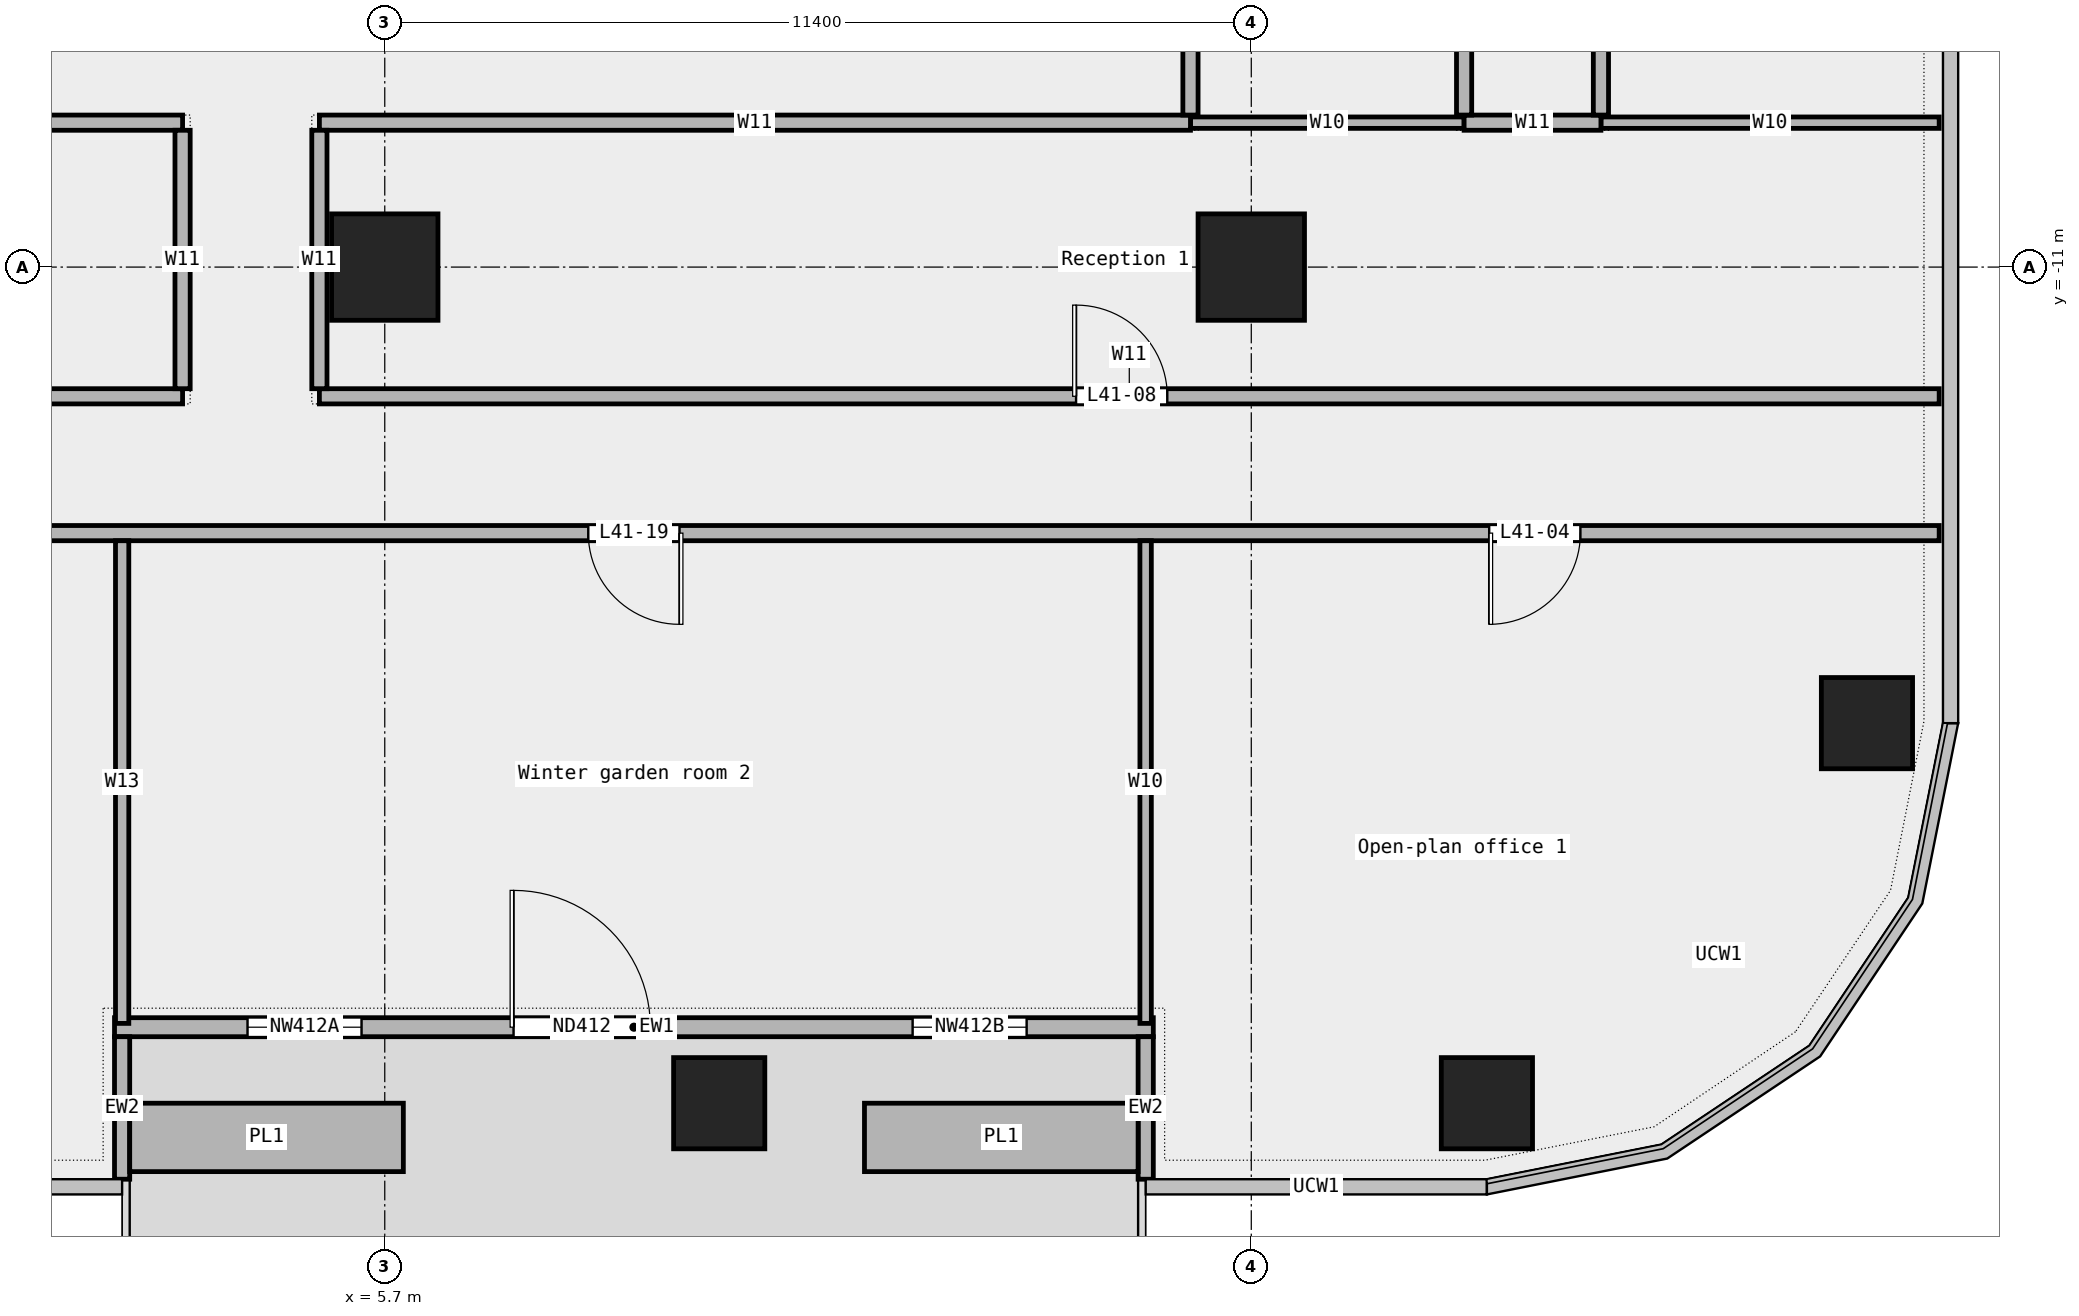
"""IFC4 building model, lengths in metres.
Left out: names, types, materials, properties, quantities, classifications, styles, units other than length and angle.
Written with IfcOpenShell. Run it as: python <this file> out.ifc"""

import sys

from ifc_helpers import new_model, si_unit, direction, frame, frame_2d, origin, origin_2d, place, context, subcontext, project, spatial, rectangle, extrude, element, fill, save


model = new_model("IFC4")
c1 = context("Model", 3, precision=1e-05, world=origin(), true_north=direction((0.0, 1.0)))
c2 = subcontext(c1, "Body", "Model", "MODEL_VIEW")
j1 = project(units=[si_unit("LENGTHUNIT", "METRE"), si_unit("PLANEANGLEUNIT", "RADIAN")], contexts=[c1])
p1 = place(None, origin())
s1 = spatial("IfcSite", under=j1, at=p1, CompositionType="ELEMENT")
p2 = place(p1, origin())
s2 = spatial("IfcBuilding", under=s1, at=p2, CompositionType="ELEMENT")
p3 = place(p2, frame((0.0, 0.0, 197.0)))
s3 = spatial("IfcBuildingStorey", under=s2, at=p3, CompositionType="ELEMENT", Elevation=197.0)
for number, where, z_axis, x_axis in (
    (1, (10.1, -22.0, 0.0), (0.0, 0.0, 1.0), (1.0, 0.0, 0.0)),
    (2, (20.2, -22.0, 0.0), (0.0, 0.0, 1.0), (1.0, 0.0, 0.0)),
    (3, (25.2, -17.0, 0.0), (0.0, 0.0, 1.0), (1.0, 0.0, 0.0)),
):
    element("IfcColumn", number, at=place(p3, frame(where, z_axis=z_axis, x_axis=x_axis)), inside=s3, PredefinedType="COLUMN", context=c2, shape_type="SweptSolid", body=[
        extrude(rectangle(XDim=1.2, YDim=1.2, at=origin_2d()), origin(), (0.0, 0.0, 1.0), 3.6),
    ])
for number, where, z_axis, x_axis in (
    (4, (5.7, -11.0, 0.0), (0.0, 0.0, 1.0), (1.0, 0.0, 0.0)),
    (5, (17.1, -11.0, 0.0), (0.0, 0.0, 1.0), (1.0, 0.0, 0.0)),
):
    element("IfcColumn", number, at=place(p3, frame(where, z_axis=z_axis, x_axis=x_axis)), inside=s3, PredefinedType="COLUMN", context=c2, shape_type="SweptSolid", body=[
        extrude(rectangle(XDim=1.4, YDim=1.4, at=origin_2d()), origin(), (0.0, 0.0, 1.0), 3.6),
    ])
p4 = place(p3, frame((2.145, -21.0, 0.0), z_axis=(0.0, 0.0, 1.0), x_axis=(1.0, 0.0, 0.0)))
e6 = element("IfcWall", 6, at=p4, inside=s3, PredefinedType="STANDARD", context=c2, shape_type="SweptSolid", body=[
    extrude(rectangle(XDim=13.667, YDim=0.25, at=frame_2d((6.833, 0.0))), origin(), (0.0, 0.0, 1.0), 3.6),
])
p5 = place(p4, frame((1.75, 0.0, 0.45)))
e7 = element("IfcOpeningElement", 7, at=p5, cuts=e6, PredefinedType="OPENING", context=c2, shape_type="SweptSolid", body=[
    extrude(rectangle(XDim=1.5, YDim=2.4, at=frame_2d((0.75, 1.2))), frame((0.0, 0.137, 0.0), z_axis=(0.0, -1.0, 0.0), x_axis=(1.0, 0.0, 0.0)), (0.0, 0.0, 1.0), 0.274),
])
p6 = place(p4, frame((5.25, 0.0, 0.0)))
e8 = element("IfcOpeningElement", 8, at=p6, cuts=e6, PredefinedType="OPENING", context=c2, shape_type="SweptSolid", body=[
    extrude(rectangle(XDim=1.8, YDim=2.4, at=frame_2d((0.9, 1.2))), frame((0.0, 0.137, 0.0), z_axis=(0.0, -1.0, 0.0), x_axis=(1.0, 0.0, 0.0)), (0.0, 0.0, 1.0), 0.274),
])
p7 = place(p4, frame((10.5, 0.0, 0.45)))
e9 = element("IfcOpeningElement", 9, at=p7, cuts=e6, PredefinedType="OPENING", context=c2, shape_type="SweptSolid", body=[
    extrude(rectangle(XDim=1.5, YDim=2.4, at=frame_2d((0.75, 1.2))), frame((0.0, 0.137, 0.0), z_axis=(0.0, -1.0, 0.0), x_axis=(1.0, 0.0, 0.0)), (0.0, 0.0, 1.0), 0.274),
])
for number, where, z_axis, x_axis in (
    (10, (2.244, -23.0, 0.0), (0.0, 0.0, 1.0), (0.0, 1.0, 0.0)),
    (11, (15.711, -23.0, 0.0), (0.0, 0.0, 1.0), (0.0, 1.0, 0.0)),
):
    element("IfcWall", number, at=place(p3, frame(where, z_axis=z_axis, x_axis=x_axis)), inside=s3, PredefinedType="STANDARD", context=c2, shape_type="SweptSolid", body=[
        extrude(rectangle(XDim=1.875, YDim=0.2, at=frame_2d((0.938, 0.0))), origin(), (0.0, 0.0, 1.0), 3.6),
    ])
for number, where, z_axis, x_axis in (
    (12, (2.344, -22.45, 0.0), (0.0, 0.0, 1.0), (1.0, 0.0, 0.0)),
    (13, (12.011, -22.45, 0.0), (0.0, 0.0, 1.0), (1.0, 0.0, 0.0)),
):
    element("IfcWall", number, at=place(p3, frame(where, z_axis=z_axis, x_axis=x_axis)), inside=s3, PredefinedType="STANDARD", context=c2, shape_type="SweptSolid", body=[
        extrude(rectangle(XDim=3.6, YDim=0.9, at=frame_2d((1.8, 0.0))), origin(), (0.0, 0.0, 1.0), 0.7),
    ])
p8 = place(p3, frame((-26.15, -14.5, 0.0), z_axis=(0.0, 0.0, 1.0), x_axis=(1.0, 0.0, 0.0)))
e14 = element("IfcWall", 14, at=p8, inside=s3, PredefinedType="PARTITIONING", context=c2, shape_type="SweptSolid", body=[
    extrude(rectangle(XDim=52.3, YDim=0.2, at=frame_2d((26.15, 0.0))), origin(), (0.0, 0.0, 1.0), 3.6),
])
p9 = place(p8, frame((46.38, 0.0, 0.0)))
e15 = element("IfcOpeningElement", 15, at=p9, cuts=e14, PredefinedType="OPENING", context=c2, shape_type="SweptSolid", body=[
    extrude(rectangle(XDim=1.2, YDim=2.1, at=frame_2d((0.6, 1.05))), frame((0.0, 0.112, 0.0), z_axis=(0.0, -1.0, 0.0), x_axis=(1.0, 0.0, 0.0)), (0.0, 0.0, 1.0), 0.224),
])
p10 = place(p8, frame((5.938, 0.0, 0.0)))
e16 = element("IfcOpeningElement", 16, at=p10, cuts=e14, PredefinedType="OPENING", context=c2, shape_type="SweptSolid", body=[
    extrude(rectangle(XDim=1.5, YDim=2.1, at=frame_2d((0.75, 1.05))), frame((0.0, 0.112, 0.0), z_axis=(0.0, -1.0, 0.0), x_axis=(1.0, 0.0, 0.0)), (0.0, 0.0, 1.0), 0.224),
])
p11 = place(p8, frame((20.035, 0.0, 0.0)))
e17 = element("IfcOpeningElement", 17, at=p11, cuts=e14, PredefinedType="OPENING", context=c2, shape_type="SweptSolid", body=[
    extrude(rectangle(XDim=1.5, YDim=2.1, at=frame_2d((0.75, 1.05))), frame((0.0, 0.112, 0.0), z_axis=(0.0, -1.0, 0.0), x_axis=(1.0, 0.0, 0.0)), (0.0, 0.0, 1.0), 0.224),
])
p12 = place(p8, frame((34.528, 0.0, 0.0)))
e18 = element("IfcOpeningElement", 18, at=p12, cuts=e14, PredefinedType="OPENING", context=c2, shape_type="SweptSolid", body=[
    extrude(rectangle(XDim=1.2, YDim=2.1, at=frame_2d((0.6, 1.05))), frame((0.0, 0.112, 0.0), z_axis=(0.0, -1.0, 0.0), x_axis=(1.0, 0.0, 0.0)), (0.0, 0.0, 1.0), 0.224),
])
p13 = place(p3, frame((-9.385, -12.7, 0.0), z_axis=(0.0, 0.0, 1.0), x_axis=(1.0, 0.0, 0.0)))
e19 = element("IfcWall", 19, at=p13, inside=s3, PredefinedType="PARTITIONING", context=c2, shape_type="SweptSolid", body=[
    extrude(rectangle(XDim=12.425, YDim=0.2, at=frame_2d((6.212, 0.0))), origin(), (0.0, 0.0, 1.0), 3.6),
])
p14 = place(p3, frame((4.84, -12.7, 0.0), z_axis=(0.0, 0.0, 1.0), x_axis=(1.0, 0.0, 0.0)))
e20 = element("IfcWall", 20, at=p14, inside=s3, PredefinedType="PARTITIONING", context=c2, shape_type="SweptSolid", body=[
    extrude(rectangle(XDim=21.31, YDim=0.2, at=frame_2d((10.655, 0.0))), origin(), (0.0, 0.0, 1.0), 3.6),
])
p15 = place(p14, frame((9.955, 0.0, 0.0)))
e21 = element("IfcOpeningElement", 21, at=p15, cuts=e20, PredefinedType="OPENING", context=c2, shape_type="SweptSolid", body=[
    extrude(rectangle(XDim=1.2, YDim=2.1, at=frame_2d((0.6, 1.05))), frame((0.0, 0.112, 0.0), z_axis=(0.0, -1.0, 0.0), x_axis=(1.0, 0.0, 0.0)), (0.0, 0.0, 1.0), 0.224),
])
p16 = place(p3, frame((16.3, -9.1, 0.0), z_axis=(0.0, 0.0, 1.0), x_axis=(1.0, 0.0, 0.0)))
e22 = element("IfcWall", 22, at=p16, inside=s3, PredefinedType="PARTITIONING", context=c2, shape_type="SweptSolid", body=[
    extrude(rectangle(XDim=3.6, YDim=0.15, at=frame_2d((1.8, 0.0))), origin(), (0.0, 0.0, 1.0), 3.6),
])
p17 = place(p3, frame((21.7, -9.1, 0.0), z_axis=(0.0, 0.0, 1.0), x_axis=(1.0, 0.0, 0.0)))
e23 = element("IfcWall", 23, at=p17, inside=s3, PredefinedType="PARTITIONING", context=c2, shape_type="SweptSolid", body=[
    extrude(rectangle(XDim=4.45, YDim=0.15, at=frame_2d((2.225, 0.0))), origin(), (0.0, 0.0, 1.0), 3.6),
])
p18 = place(p3, frame((-9.385, -9.1, 0.0), z_axis=(0.0, 0.0, 1.0), x_axis=(1.0, 0.0, 0.0)))
e24 = element("IfcWall", 24, at=p18, inside=s3, PredefinedType="PARTITIONING", context=c2, shape_type="SweptSolid", body=[
    extrude(rectangle(XDim=12.425, YDim=0.2, at=frame_2d((6.212, 0.0))), origin(), (0.0, 0.0, 1.0), 3.6),
])
p19 = place(p18, frame((5.762, 0.0, 0.0)))
e25 = element("IfcOpeningElement", 25, at=p19, cuts=e24, PredefinedType="OPENING", context=c2, shape_type="SweptSolid", body=[
    extrude(rectangle(XDim=0.9, YDim=2.1, at=frame_2d((0.45, 1.05))), frame((0.0, 0.112, 0.0), z_axis=(0.0, -1.0, 0.0), x_axis=(1.0, 0.0, 0.0)), (0.0, 0.0, 1.0), 0.224),
])
p20 = place(p3, frame((4.84, -9.1, 0.0), z_axis=(0.0, 0.0, 1.0), x_axis=(1.0, 0.0, 0.0)))
e26 = element("IfcWall", 26, at=p20, inside=s3, PredefinedType="PARTITIONING", context=c2, shape_type="SweptSolid", body=[
    extrude(rectangle(XDim=11.46, YDim=0.2, at=frame_2d((5.73, 0.0))), origin(), (0.0, 0.0, 1.0), 3.6),
])
p21 = place(p3, frame((19.9, -9.1, 0.0), z_axis=(0.0, 0.0, 1.0), x_axis=(1.0, 0.0, 0.0)))
e27 = element("IfcWall", 27, at=p21, inside=s3, PredefinedType="PARTITIONING", context=c2, shape_type="SweptSolid", body=[
    extrude(rectangle(XDim=1.8, YDim=0.2, at=frame_2d((0.9, 0.0))), origin(), (0.0, 0.0, 1.0), 3.6),
])
p22 = place(p3, frame((2.245, -20.95, 0.0), z_axis=(0.0, 0.0, 1.0), x_axis=(0.0, 1.0, 0.0)))
e28 = element("IfcWall", 28, at=p22, inside=s3, PredefinedType="PARTITIONING", context=c2, shape_type="SweptSolid", body=[
    extrude(rectangle(XDim=6.35, YDim=0.175, at=frame_2d((3.175, 0.0))), origin(), (0.0, 0.0, 1.0), 3.6),
])
for number, where, z_axis, x_axis in (
    (29, (3.04, -12.6, 0.0), (0.0, 0.0, 1.0), (0.0, 1.0, 0.0)),
    (30, (4.84, -12.6, 0.0), (0.0, 0.0, 1.0), (0.0, 1.0, 0.0)),
):
    element("IfcWall", number, at=place(p3, frame(where, z_axis=z_axis, x_axis=x_axis)), inside=s3, PredefinedType="PARTITIONING", context=c2, shape_type="SweptSolid", body=[
        extrude(rectangle(XDim=3.4, YDim=0.2, at=frame_2d((1.7, 0.0))), origin(), (0.0, 0.0, 1.0), 3.6),
    ])
p23 = place(p3, frame((15.71, -20.95, 0.0), z_axis=(0.0, 0.0, 1.0), x_axis=(0.0, 1.0, 0.0)))
e31 = element("IfcWall", 31, at=p23, inside=s3, PredefinedType="PARTITIONING", context=c2, shape_type="SweptSolid", body=[
    extrude(rectangle(XDim=6.35, YDim=0.15, at=frame_2d((3.175, 0.0))), origin(), (0.0, 0.0, 1.0), 3.6),
])
p24 = place(p3, frame((16.3, -9.0, 0.0), z_axis=(0.0, 0.0, 1.0), x_axis=(0.0, 1.0, 0.0)))
e32 = element("IfcWall", 32, at=p24, inside=s3, PredefinedType="PARTITIONING", context=c2, shape_type="SweptSolid", body=[
    extrude(rectangle(XDim=8.3, YDim=0.2, at=frame_2d((4.15, 0.0))), origin(), (0.0, 0.0, 1.0), 3.6),
])
p25 = place(p3, frame((19.9, -9.0, 0.0), z_axis=(0.0, 0.0, 1.0), x_axis=(0.0, 1.0, 0.0)))
e33 = element("IfcWall", 33, at=p25, inside=s3, PredefinedType="PARTITIONING", context=c2, shape_type="SweptSolid", body=[
    extrude(rectangle(XDim=11.15, YDim=0.2, at=frame_2d((5.575, 0.0))), origin(), (0.0, 0.0, 1.0), 3.6),
])
p26 = place(p25, frame((5.125, 0.0, 0.0)))
e34 = element("IfcOpeningElement", 34, at=p26, cuts=e33, PredefinedType="OPENING", context=c2, shape_type="SweptSolid", body=[
    extrude(rectangle(XDim=0.9, YDim=2.1, at=frame_2d((0.45, 1.05))), frame((0.0, 0.112, 0.0), z_axis=(0.0, -1.0, 0.0), x_axis=(1.0, 0.0, 0.0)), (0.0, 0.0, 1.0), 0.224),
])
p27 = place(p3, frame((21.7, -9.0, 0.0), z_axis=(0.0, 0.0, 1.0), x_axis=(0.0, 1.0, 0.0)))
e35 = element("IfcWall", 35, at=p27, inside=s3, PredefinedType="PARTITIONING", context=c2, shape_type="SweptSolid", body=[
    extrude(rectangle(XDim=24.3, YDim=0.2, at=frame_2d((12.15, 0.0))), origin(), (0.0, 0.0, 1.0), 3.6),
])
p28 = place(p27, frame((4.795, 0.0, 0.0)))
e36 = element("IfcOpeningElement", 36, at=p28, cuts=e35, PredefinedType="OPENING", context=c2, shape_type="SweptSolid", body=[
    extrude(rectangle(XDim=1.2, YDim=2.1, at=frame_2d((0.6, 1.05))), frame((0.0, 0.112, 0.0), z_axis=(0.0, -1.0, 0.0), x_axis=(1.0, 0.0, 0.0)), (0.0, 0.0, 1.0), 0.224),
])
p29 = place(p27, frame((16.795, 0.0, 0.0)))
e37 = element("IfcOpeningElement", 37, at=p29, cuts=e35, PredefinedType="OPENING", context=c2, shape_type="SweptSolid", body=[
    extrude(rectangle(XDim=1.5, YDim=2.1, at=frame_2d((0.75, 1.05))), frame((0.0, 0.112, 0.0), z_axis=(0.0, -1.0, 0.0), x_axis=(1.0, 0.0, 0.0)), (0.0, 0.0, 1.0), 0.224),
])
p30 = place(p5, origin())
e38 = element("IfcWindow", 38, at=p30, inside=s3, PartitioningType="SINGLE_PANEL", PredefinedType="WINDOW", context=c2, shape_type="SweptSolid", body=[
    extrude(rectangle(XDim=1.5, YDim=2.4, at=frame_2d((0.75, 1.2))), frame((0.0, 0.03, 0.0), z_axis=(0.0, -1.0, 0.0), x_axis=(1.0, 0.0, 0.0)), (0.0, 0.0, 1.0), 0.06),
])
fill(e7, e38)
p31 = place(p6, origin())
e39 = element("IfcDoor", 39, at=p31, inside=s3, OperationType="DOUBLE_DOOR_SINGLE_SWING", PredefinedType="DOOR", context=c2, shape_type="SweptSolid", body=[
    extrude(rectangle(XDim=1.8, YDim=2.4, at=frame_2d((0.9, 1.2))), frame((0.0, 0.025, 0.0), z_axis=(0.0, -1.0, 0.0), x_axis=(1.0, 0.0, 0.0)), (0.0, 0.0, 1.0), 0.05),
])
fill(e8, e39)
p32 = place(p7, origin())
e40 = element("IfcWindow", 40, at=p32, inside=s3, PartitioningType="SINGLE_PANEL", PredefinedType="WINDOW", context=c2, shape_type="SweptSolid", body=[
    extrude(rectangle(XDim=1.5, YDim=2.4, at=frame_2d((0.75, 1.2))), frame((0.0, 0.03, 0.0), z_axis=(0.0, -1.0, 0.0), x_axis=(1.0, 0.0, 0.0)), (0.0, 0.0, 1.0), 0.06),
])
fill(e9, e40)
p33 = place(p9, origin())
e41 = element("IfcDoor", 41, at=p33, inside=s3, OperationType="SINGLE_SWING_RIGHT", PredefinedType="DOOR", context=c2, shape_type="SweptSolid", body=[
    extrude(rectangle(XDim=1.2, YDim=2.1, at=frame_2d((0.6, 1.05))), frame((0.0, 0.025, 0.0), z_axis=(0.0, -1.0, 0.0), x_axis=(1.0, 0.0, 0.0)), (0.0, 0.0, 1.0), 0.05),
])
fill(e15, e41)
p34 = place(p15, origin())
e42 = element("IfcDoor", 42, at=p34, inside=s3, OperationType="SINGLE_SWING_LEFT", PredefinedType="DOOR", context=c2, shape_type="SweptSolid", body=[
    extrude(rectangle(XDim=1.2, YDim=2.1, at=frame_2d((0.6, 1.05))), frame((0.0, 0.025, 0.0), z_axis=(0.0, -1.0, 0.0), x_axis=(1.0, 0.0, 0.0)), (0.0, 0.0, 1.0), 0.05),
])
fill(e21, e42)
p35 = place(p12, origin())
e43 = element("IfcDoor", 43, at=p35, inside=s3, OperationType="SINGLE_SWING_LEFT", PredefinedType="DOOR", context=c2, shape_type="SweptSolid", body=[
    extrude(rectangle(XDim=1.2, YDim=2.1, at=frame_2d((0.6, 1.05))), frame((0.0, 0.025, 0.0), z_axis=(0.0, -1.0, 0.0), x_axis=(1.0, 0.0, 0.0)), (0.0, 0.0, 1.0), 0.05),
])
fill(e18, e43)
save(model, sys.argv[1])
